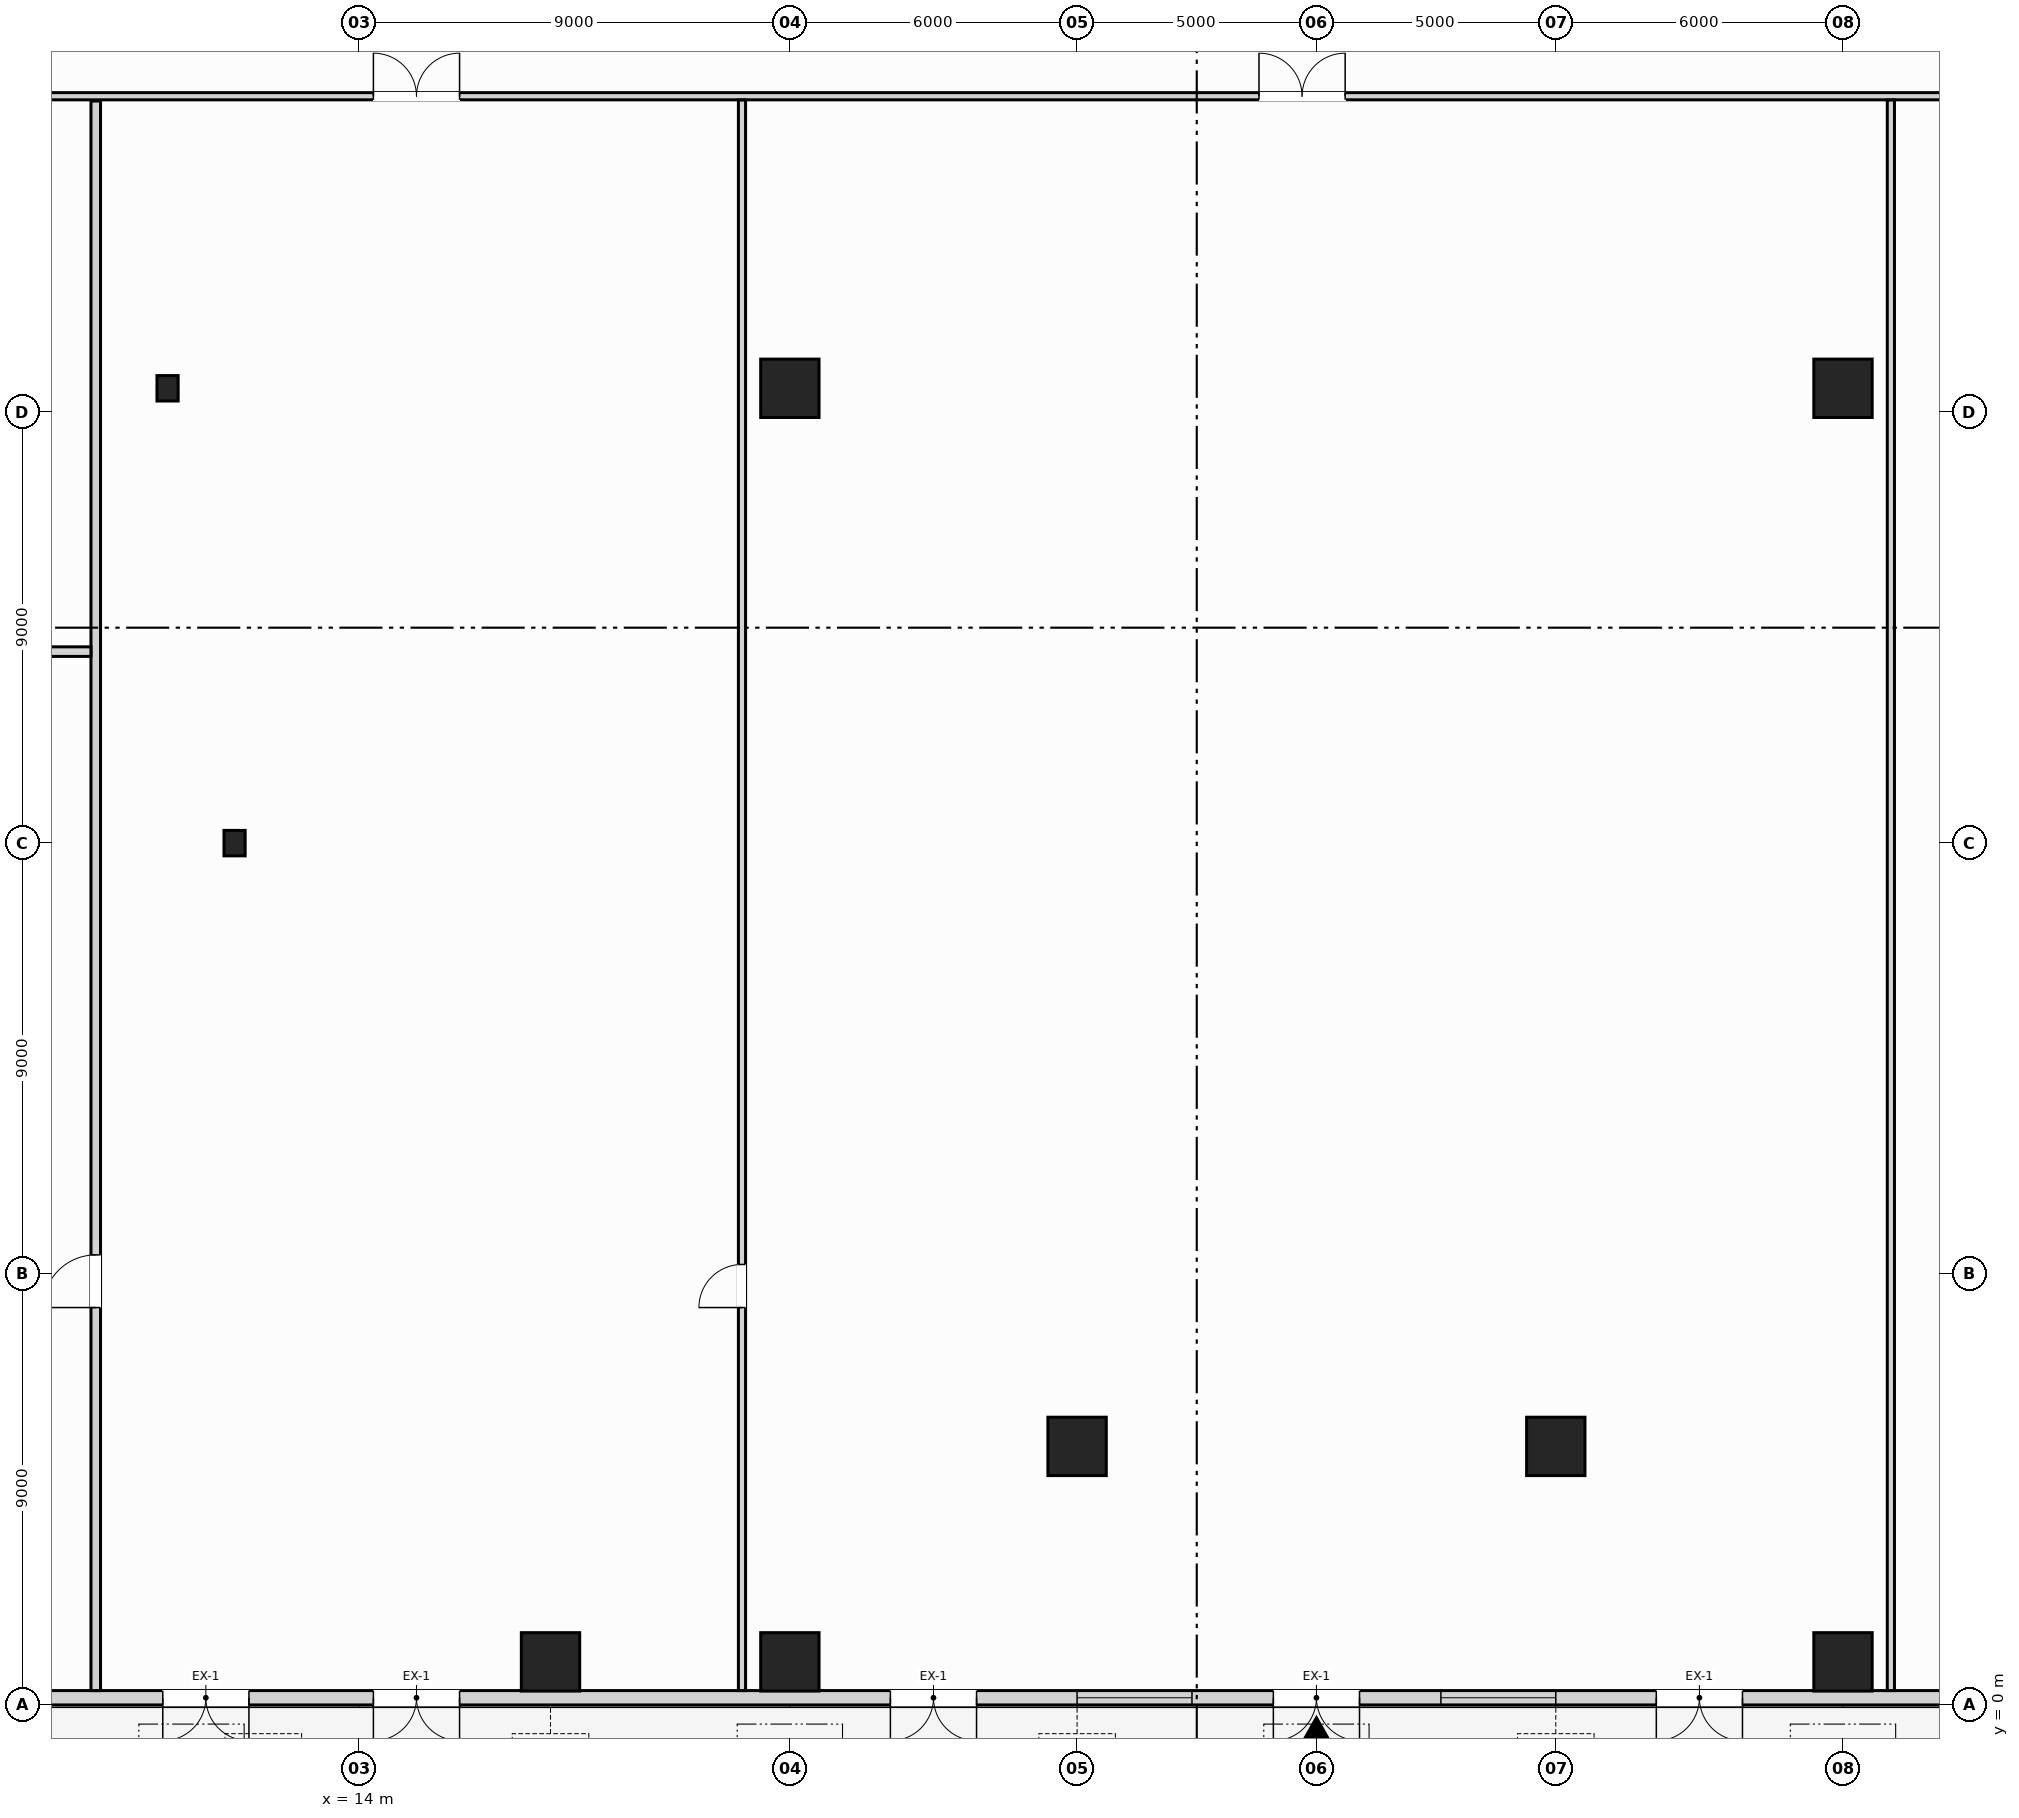
"""IFC4 building model, lengths in metres.
Left out: names, types, materials, properties, quantities, classifications, styles, units other than length and angle.
Written with IfcOpenShell. Run it as: python <this file> out.ifc"""

import sys

from ifc_helpers import new_model, si_unit, direction, frame, frame_2d, origin, origin_2d, place, context, subcontext, project, spatial, rectangle, hollow_circle, i_section, extrude, source, transform, mapped, element, fill, save


model = new_model("IFC4")
c1 = context("Model", 3, precision=1e-05, world=origin(), true_north=direction((0.0, 1.0)))
c2 = subcontext(c1, "Body", "Model", "MODEL_VIEW")
j1 = project(units=[si_unit("LENGTHUNIT", "METRE"), si_unit("PLANEANGLEUNIT", "RADIAN")], contexts=[c1])
p1 = place(None, origin())
s1 = spatial("IfcSite", under=j1, at=p1, CompositionType="ELEMENT")
p2 = place(p1, origin())
s2 = spatial("IfcBuilding", under=s1, at=p2, CompositionType="ELEMENT")
p3 = place(p2, origin())
s3 = spatial("IfcBuildingStorey", under=s2, at=p3, CompositionType="ELEMENT", Elevation=0.0)
m1 = source(origin(), c2, "Body", "SweptSolid", [
    extrude(hollow_circle(Radius=0.61, WallThickness=0.05, at=origin_2d()), origin(), (0.0, 0.0, 1.0), 5.6),
])
for number, where, z_axis, x_axis in (
    (1, (18.0, 0.9, 0.0), (0.0, 0.0, 1.0), (1.0, 0.0, 0.0)),
    (2, (23.0, 0.9, 0.0), (0.0, 0.0, 1.0), (1.0, 0.0, 0.0)),
    (3, (29.0, 5.4, 0.0), (0.0, 0.0, 1.0), (1.0, 0.0, 0.0)),
    (4, (39.0, 5.4, 0.0), (0.0, 0.0, 1.0), (1.0, 0.0, 0.0)),
    (5, (45.0, 0.9, 0.0), (0.0, 0.0, 1.0), (1.0, 0.0, 0.0)),
):
    element("IfcColumn", number, at=place(p3, frame(where, z_axis=z_axis, x_axis=x_axis)), inside=s3, PredefinedType="COLUMN", context=c2, shape_type="MappedRepresentation", body=[
        mapped(m1, transform((0.0, 0.0, 0.0), scale=1.0)),
    ])
m2 = source(origin(), c2, "Body", "SweptSolid", [
    extrude(i_section(OverallWidth=0.442, OverallDepth=0.531, WebThickness=0.065, FlangeThickness=0.076, FilletRadius=0.015, at=origin_2d()), origin(), (0.0, 0.0, 1.0), 5.6),
])
for number, where, z_axis, x_axis in (
    (6, (10.0, 27.5, 0.0), (0.0, 0.0, 1.0), (1.0, 0.0, 0.0)),
    (7, (11.4, 18.0, 0.0), (0.0, 0.0, 1.0), (1.0, 0.0, 0.0)),
):
    element("IfcColumn", number, at=place(p3, frame(where, z_axis=z_axis, x_axis=x_axis)), inside=s3, PredefinedType="COLUMN", context=c2, shape_type="MappedRepresentation", body=[
        mapped(m2, transform((0.0, 0.0, 0.0), scale=1.0)),
    ])
for number, where, z_axis, x_axis in (
    (8, (23.0, 27.5, 0.0), (0.0, 0.0, 1.0), (1.0, 0.0, 0.0)),
    (9, (45.0, 27.5, 0.0), (0.0, 0.0, 1.0), (1.0, 0.0, 0.0)),
):
    element("IfcColumn", number, at=place(p3, frame(where, z_axis=z_axis, x_axis=x_axis)), inside=s3, PredefinedType="COLUMN", context=c2, shape_type="MappedRepresentation", body=[
        mapped(m1, transform((0.0, 0.0, 0.0), scale=1.0)),
    ])
p4 = place(p3, frame((66.34, 0.15, 0.0), z_axis=(0.0, 0.0, 1.0), x_axis=(-1.0, 0.0, 0.0)))
e10 = element("IfcWall", 10, at=p4, inside=s3, PredefinedType="STANDARD", context=c2, shape_type="SweptSolid", body=[
    extrude(rectangle(XDim=64.68, YDim=0.3, at=frame_2d((32.34, 0.0))), origin(), (0.0, 0.0, 1.0), 5.32),
])
p5 = place(p4, frame((54.64, 0.0, 0.0)))
e11 = element("IfcOpeningElement", 11, at=p5, cuts=e10, PredefinedType="OPENING", context=c2, shape_type="SweptSolid", body=[
    extrude(rectangle(XDim=1.8, YDim=2.4, at=frame_2d((0.9, 1.2))), frame((0.0, 0.16, 0.0), z_axis=(0.0, -1.0, 0.0), x_axis=(1.0, 0.0, 0.0)), (0.0, 0.0, 1.0), 0.32),
])
p6 = place(p4, frame((50.24, 0.0, 0.0)))
e12 = element("IfcOpeningElement", 12, at=p6, cuts=e10, PredefinedType="OPENING", context=c2, shape_type="SweptSolid", body=[
    extrude(rectangle(XDim=1.8, YDim=2.4, at=frame_2d((0.9, 1.2))), frame((0.0, 0.16, 0.0), z_axis=(0.0, -1.0, 0.0), x_axis=(1.0, 0.0, 0.0)), (0.0, 0.0, 1.0), 0.32),
])
p7 = place(p4, frame((39.44, 0.0, 0.0)))
e13 = element("IfcOpeningElement", 13, at=p7, cuts=e10, PredefinedType="OPENING", context=c2, shape_type="SweptSolid", body=[
    extrude(rectangle(XDim=1.8, YDim=2.4, at=frame_2d((0.9, 1.2))), frame((0.0, 0.16, 0.0), z_axis=(0.0, -1.0, 0.0), x_axis=(1.0, 0.0, 0.0)), (0.0, 0.0, 1.0), 0.32),
])
p8 = place(p4, frame((31.44, 0.0, 0.0)))
e14 = element("IfcOpeningElement", 14, at=p8, cuts=e10, PredefinedType="OPENING", context=c2, shape_type="SweptSolid", body=[
    extrude(rectangle(XDim=1.8, YDim=2.4, at=frame_2d((0.9, 1.2))), frame((0.0, 0.16, 0.0), z_axis=(0.0, -1.0, 0.0), x_axis=(1.0, 0.0, 0.0)), (0.0, 0.0, 1.0), 0.32),
])
p9 = place(p4, frame((23.44, 0.0, 0.0)))
e15 = element("IfcOpeningElement", 15, at=p9, cuts=e10, PredefinedType="OPENING", context=c2, shape_type="SweptSolid", body=[
    extrude(rectangle(XDim=1.8, YDim=2.4, at=frame_2d((0.9, 1.2))), frame((0.0, 0.16, 0.0), z_axis=(0.0, -1.0, 0.0), x_axis=(1.0, 0.0, 0.0)), (0.0, 0.0, 1.0), 0.32),
])
p10 = place(p4, frame((12.44, 0.0, 0.0)))
e16 = element("IfcOpeningElement", 16, at=p10, cuts=e10, PredefinedType="OPENING", context=c2, shape_type="SweptSolid", body=[
    extrude(rectangle(XDim=1.8, YDim=2.4, at=frame_2d((0.9, 1.2))), frame((0.0, 0.16, 0.0), z_axis=(0.0, -1.0, 0.0), x_axis=(1.0, 0.0, 0.0)), (0.0, 0.0, 1.0), 0.32),
])
p11 = place(p4, frame((8.24, 0.0, 0.0)))
e17 = element("IfcOpeningElement", 17, at=p11, cuts=e10, PredefinedType="OPENING", context=c2, shape_type="SweptSolid", body=[
    extrude(rectangle(XDim=1.8, YDim=2.4, at=frame_2d((0.9, 1.2))), frame((0.0, 0.16, 0.0), z_axis=(0.0, -1.0, 0.0), x_axis=(1.0, 0.0, 0.0)), (0.0, 0.0, 1.0), 0.32),
])
p12 = place(p4, frame((1.64, 0.0, 0.0)))
e18 = element("IfcOpeningElement", 18, at=p12, cuts=e10, PredefinedType="OPENING", context=c2, shape_type="SweptSolid", body=[
    extrude(rectangle(XDim=1.8, YDim=2.4, at=frame_2d((0.9, 1.2))), frame((0.0, 0.16, 0.0), z_axis=(0.0, -1.0, 0.0), x_axis=(1.0, 0.0, 0.0)), (0.0, 0.0, 1.0), 0.32),
])
p13 = place(p4, frame((60.34, 0.0, 1.1)))
e19 = element("IfcOpeningElement", 19, at=p13, cuts=e10, PredefinedType="OPENING", context=c2, shape_type="SweptSolid", body=[
    extrude(rectangle(XDim=2.4, YDim=2.2, at=frame_2d((1.2, 1.1))), frame((0.0, 0.16, 0.0), z_axis=(0.0, -1.0, 0.0), x_axis=(1.0, 0.0, 0.0)), (0.0, 0.0, 1.0), 0.32),
])
p14 = place(p4, frame((34.94, 0.0, 1.1)))
e20 = element("IfcOpeningElement", 20, at=p14, cuts=e10, PredefinedType="OPENING", context=c2, shape_type="SweptSolid", body=[
    extrude(rectangle(XDim=2.4, YDim=2.2, at=frame_2d((1.2, 1.1))), frame((0.0, 0.16, 0.0), z_axis=(0.0, -1.0, 0.0), x_axis=(1.0, 0.0, 0.0)), (0.0, 0.0, 1.0), 0.32),
])
p15 = place(p4, frame((27.34, 0.0, 1.1)))
e21 = element("IfcOpeningElement", 21, at=p15, cuts=e10, PredefinedType="OPENING", context=c2, shape_type="SweptSolid", body=[
    extrude(rectangle(XDim=2.4, YDim=2.2, at=frame_2d((1.2, 1.1))), frame((0.0, 0.16, 0.0), z_axis=(0.0, -1.0, 0.0), x_axis=(1.0, 0.0, 0.0)), (0.0, 0.0, 1.0), 0.32),
])
p16 = place(p4, frame((4.74, 0.0, 1.1)))
e22 = element("IfcOpeningElement", 22, at=p16, cuts=e10, PredefinedType="OPENING", context=c2, shape_type="SweptSolid", body=[
    extrude(rectangle(XDim=2.4, YDim=2.2, at=frame_2d((1.2, 1.1))), frame((0.0, 0.16, 0.0), z_axis=(0.0, -1.0, 0.0), x_axis=(1.0, 0.0, 0.0)), (0.0, 0.0, 1.0), 0.32),
])
p17 = place(p3, frame((0.3, 33.6, 0.0), z_axis=(0.0, 0.0, 1.0), x_axis=(1.0, 0.0, 0.0)))
e23 = element("IfcWall", 23, at=p17, inside=s3, PredefinedType="PARTITIONING", context=c2, shape_type="SweptSolid", body=[
    extrude(rectangle(XDim=59.3, YDim=0.15, at=frame_2d((29.65, 0.0))), origin(), (0.0, 0.0, 1.0), 5.32),
])
p18 = place(p17, frame((3.5, 0.0, 0.0)))
e24 = element("IfcOpeningElement", 24, at=p18, cuts=e23, PredefinedType="OPENING", context=c2, shape_type="SweptSolid", body=[
    extrude(rectangle(XDim=1.1, YDim=2.15, at=frame_2d((0.55, 1.075))), frame((0.0, 0.085, 0.0), z_axis=(0.0, -1.0, 0.0), x_axis=(1.0, 0.0, 0.0)), (0.0, 0.0, 1.0), 0.17),
])
p19 = place(p17, frame((14.0, 0.0, 0.0)))
e25 = element("IfcOpeningElement", 25, at=p19, cuts=e23, PredefinedType="OPENING", context=c2, shape_type="SweptSolid", body=[
    extrude(rectangle(XDim=1.8, YDim=2.25, at=frame_2d((0.9, 1.125))), frame((0.0, 0.085, 0.0), z_axis=(0.0, -1.0, 0.0), x_axis=(1.0, 0.0, 0.0)), (0.0, 0.0, 1.0), 0.17),
])
p20 = place(p17, frame((32.5, 0.0, 0.0)))
e26 = element("IfcOpeningElement", 26, at=p20, cuts=e23, PredefinedType="OPENING", context=c2, shape_type="SweptSolid", body=[
    extrude(rectangle(XDim=1.8, YDim=2.25, at=frame_2d((0.9, 1.125))), frame((0.0, 0.085, 0.0), z_axis=(0.0, -1.0, 0.0), x_axis=(1.0, 0.0, 0.0)), (0.0, 0.0, 1.0), 0.17),
])
p21 = place(p17, frame((51.5, 0.0, 0.0)))
e27 = element("IfcOpeningElement", 27, at=p21, cuts=e23, PredefinedType="OPENING", context=c2, shape_type="SweptSolid", body=[
    extrude(rectangle(XDim=1.8, YDim=2.25, at=frame_2d((0.9, 1.125))), frame((0.0, 0.085, 0.0), z_axis=(0.0, -1.0, 0.0), x_axis=(1.0, 0.0, 0.0)), (0.0, 0.0, 1.0), 0.17),
])
p22 = place(p3, frame((8.5, 0.3, 0.0), z_axis=(0.0, 0.0, 1.0), x_axis=(0.0, 1.0, 0.0)))
e28 = element("IfcWall", 28, at=p22, inside=s3, PredefinedType="SOLIDWALL", context=c2, shape_type="SweptSolid", body=[
    extrude(rectangle(XDim=33.2, YDim=0.2, at=frame_2d((16.6, 0.0))), origin(), (0.0, 0.0, 1.0), 4.4),
])
p23 = place(p22, frame((8.0, 0.0, 0.0)))
e29 = element("IfcOpeningElement", 29, at=p23, cuts=e28, PredefinedType="OPENING", context=c2, shape_type="SweptSolid", body=[
    extrude(rectangle(XDim=1.1, YDim=2.15, at=frame_2d((0.55, 1.075))), frame((0.0, 0.11, 0.0), z_axis=(0.0, -1.0, 0.0), x_axis=(1.0, 0.0, 0.0)), (0.0, 0.0, 1.0), 0.22),
])
p24 = place(p3, frame((0.3, 22.0, 0.0), z_axis=(0.0, 0.0, 1.0), x_axis=(1.0, 0.0, 0.0)))
e30 = element("IfcWall", 30, at=p24, inside=s3, PredefinedType="SOLIDWALL", context=c2, shape_type="SweptSolid", body=[
    extrude(rectangle(XDim=8.1, YDim=0.2, at=frame_2d((4.05, 0.0))), origin(), (0.0, 0.0, 1.0), 5.32),
])
p25 = place(p3, frame((22.0, 0.3, 0.0), z_axis=(0.0, 0.0, 1.0), x_axis=(0.0, 1.0, 0.0)))
e31 = element("IfcWall", 31, at=p25, inside=s3, PredefinedType="PARTITIONING", context=c2, shape_type="SweptSolid", body=[
    extrude(rectangle(XDim=33.22, YDim=0.15, at=frame_2d((16.61, 0.0))), origin(), (0.0, 0.0, 1.0), 5.32),
])
p26 = place(p25, frame((8.0, 0.0, 0.0)))
e32 = element("IfcOpeningElement", 32, at=p26, cuts=e31, PredefinedType="OPENING", context=c2, shape_type="SweptSolid", body=[
    extrude(rectangle(XDim=0.9, YDim=2.15, at=frame_2d((0.45, 1.075))), frame((0.0, 0.085, 0.0), z_axis=(0.0, -1.0, 0.0), x_axis=(1.0, 0.0, 0.0)), (0.0, 0.0, 1.0), 0.17),
])
p27 = place(p3, frame((46.0, 0.3, 0.0), z_axis=(0.0, 0.0, 1.0), x_axis=(0.0, 1.0, 0.0)))
e33 = element("IfcWall", 33, at=p27, inside=s3, PredefinedType="PARTITIONING", context=c2, shape_type="SweptSolid", body=[
    extrude(rectangle(XDim=33.22, YDim=0.15, at=frame_2d((16.61, 0.0))), origin(), (0.0, 0.0, 1.0), 5.32),
])
m3 = source(origin(), c2, "Body", "SweptSolid", [
    extrude(rectangle(XDim=1.8, YDim=2.4, at=frame_2d((0.9, 1.2))), frame((0.0, 0.025, 0.0), z_axis=(0.0, -1.0, 0.0), x_axis=(1.0, 0.0, 0.0)), (0.0, 0.0, 1.0), 0.05),
])
p28 = place(p5, origin())
e34 = element("IfcDoor", 34, at=p28, inside=s3, OperationType="DOUBLE_DOOR_SINGLE_SWING", PredefinedType="DOOR", context=c2, shape_type="MappedRepresentation", body=[
    mapped(m3, transform((0.0, 0.0, 0.0), scale=1.0)),
])
fill(e11, e34)
p29 = place(p6, origin())
e35 = element("IfcDoor", 35, at=p29, inside=s3, OperationType="DOUBLE_DOOR_SINGLE_SWING", PredefinedType="DOOR", context=c2, shape_type="MappedRepresentation", body=[
    mapped(m3, transform((0.0, 0.0, 0.0), scale=1.0)),
])
fill(e12, e35)
p30 = place(p7, origin())
e36 = element("IfcDoor", 36, at=p30, inside=s3, OperationType="DOUBLE_DOOR_SINGLE_SWING", PredefinedType="DOOR", context=c2, shape_type="MappedRepresentation", body=[
    mapped(m3, transform((0.0, 0.0, 0.0), scale=1.0)),
])
fill(e13, e36)
p31 = place(p8, origin())
e37 = element("IfcDoor", 37, at=p31, inside=s3, OperationType="DOUBLE_DOOR_SINGLE_SWING", PredefinedType="DOOR", context=c2, shape_type="MappedRepresentation", body=[
    mapped(m3, transform((0.0, 0.0, 0.0), scale=1.0)),
])
fill(e14, e37)
p32 = place(p9, origin())
e38 = element("IfcDoor", 38, at=p32, inside=s3, OperationType="DOUBLE_DOOR_SINGLE_SWING", PredefinedType="DOOR", context=c2, shape_type="MappedRepresentation", body=[
    mapped(m3, transform((0.0, 0.0, 0.0), scale=1.0)),
])
fill(e15, e38)
m4 = source(origin(), c2, "Body", "SweptSolid", [
    extrude(rectangle(XDim=2.4, YDim=2.2, at=frame_2d((1.2, 1.1))), frame((0.0, 0.03, 0.0), z_axis=(0.0, -1.0, 0.0), x_axis=(1.0, 0.0, 0.0)), (0.0, 0.0, 1.0), 0.06),
])
p33 = place(p14, origin())
e39 = element("IfcWindow", 39, at=p33, inside=s3, PartitioningType="SINGLE_PANEL", PredefinedType="WINDOW", context=c2, shape_type="MappedRepresentation", body=[
    mapped(m4, transform((0.0, 0.0, 0.0), scale=1.0)),
])
fill(e20, e39)
p34 = place(p15, origin())
e40 = element("IfcWindow", 40, at=p34, inside=s3, PartitioningType="SINGLE_PANEL", PredefinedType="WINDOW", context=c2, shape_type="MappedRepresentation", body=[
    mapped(m4, transform((0.0, 0.0, 0.0), scale=1.0)),
])
fill(e21, e40)
p35 = place(p3, frame((0.0, 0.0, 4.8)))
p36 = place(p35, frame((10.5, -1.0, 0.0)))
p37 = place(p36, frame((0.0, 0.0, 0.17)))
e41 = element("IfcWindow", 41, at=p37, inside=s3, PartitioningType="SINGLE_PANEL", PredefinedType="SKYLIGHT", context=c2, shape_type="SweptSolid", body=[
    extrude(rectangle(XDim=2.2, YDim=1.2, at=origin_2d()), origin(), (0.0, 0.0, 1.0), 0.05),
])
p38 = place(p35, frame((23.0, -1.0, 0.0)))
p39 = place(p38, frame((0.0, 0.0, 0.17)))
e42 = element("IfcWindow", 42, at=p39, inside=s3, PartitioningType="SINGLE_PANEL", PredefinedType="SKYLIGHT", context=c2, shape_type="SweptSolid", body=[
    extrude(rectangle(XDim=2.2, YDim=1.2, at=origin_2d()), origin(), (0.0, 0.0, 1.0), 0.05),
])
p40 = place(p35, frame((34.0, -1.0, 0.0)))
p41 = place(p40, frame((0.0, 0.0, 0.17)))
e43 = element("IfcWindow", 43, at=p41, inside=s3, PartitioningType="SINGLE_PANEL", PredefinedType="SKYLIGHT", context=c2, shape_type="SweptSolid", body=[
    extrude(rectangle(XDim=2.2, YDim=1.2, at=origin_2d()), origin(), (0.0, 0.0, 1.0), 0.05),
])
p42 = place(p35, frame((45.0, -1.0, 0.0)))
p43 = place(p42, frame((0.0, 0.0, 0.17)))
e44 = element("IfcWindow", 44, at=p43, inside=s3, PartitioningType="SINGLE_PANEL", PredefinedType="SKYLIGHT", context=c2, shape_type="SweptSolid", body=[
    extrude(rectangle(XDim=2.2, YDim=1.2, at=origin_2d()), origin(), (0.0, 0.0, 1.0), 0.05),
])
m5 = source(origin(), c2, "Body", "SweptSolid", [
    extrude(rectangle(XDim=1.1, YDim=2.15, at=frame_2d((0.55, 1.075))), frame((0.0, 0.025, 0.0), z_axis=(0.0, -1.0, 0.0), x_axis=(1.0, 0.0, 0.0)), (0.0, 0.0, 1.0), 0.05),
])
p44 = place(p23, origin())
e45 = element("IfcDoor", 45, at=p44, inside=s3, OperationType="SINGLE_SWING_RIGHT", PredefinedType="DOOR", context=c2, shape_type="MappedRepresentation", body=[
    mapped(m5, transform((0.0, 0.0, 0.0), scale=1.0)),
])
fill(e29, e45)
m6 = source(origin(), c2, "Body", "SweptSolid", [
    extrude(rectangle(XDim=1.8, YDim=2.25, at=frame_2d((0.9, 1.125))), frame((0.0, 0.025, 0.0), z_axis=(0.0, -1.0, 0.0), x_axis=(1.0, 0.0, 0.0)), (0.0, 0.0, 1.0), 0.05),
])
p45 = place(p19, origin())
e46 = element("IfcDoor", 46, at=p45, inside=s3, OperationType="DOUBLE_DOOR_SINGLE_SWING", PredefinedType="DOOR", context=c2, shape_type="MappedRepresentation", body=[
    mapped(m6, transform((0.0, 0.0, 0.0), scale=1.0)),
])
fill(e25, e46)
p46 = place(p20, origin())
e47 = element("IfcDoor", 47, at=p46, inside=s3, OperationType="DOUBLE_DOOR_SINGLE_SWING", PredefinedType="DOOR", context=c2, shape_type="MappedRepresentation", body=[
    mapped(m6, transform((0.0, 0.0, 0.0), scale=1.0)),
])
fill(e26, e47)
m7 = source(origin(), c2, "Body", "SweptSolid", [
    extrude(rectangle(XDim=0.9, YDim=2.15, at=frame_2d((0.45, 1.075))), frame((0.0, 0.025, 0.0), z_axis=(0.0, -1.0, 0.0), x_axis=(1.0, 0.0, 0.0)), (0.0, 0.0, 1.0), 0.05),
])
p47 = place(p26, origin())
e48 = element("IfcDoor", 48, at=p47, inside=s3, OperationType="SINGLE_SWING_LEFT", PredefinedType="DOOR", context=c2, shape_type="MappedRepresentation", body=[
    mapped(m7, transform((0.0, 0.0, 0.0), scale=1.0)),
])
fill(e32, e48)
save(model, sys.argv[1])
